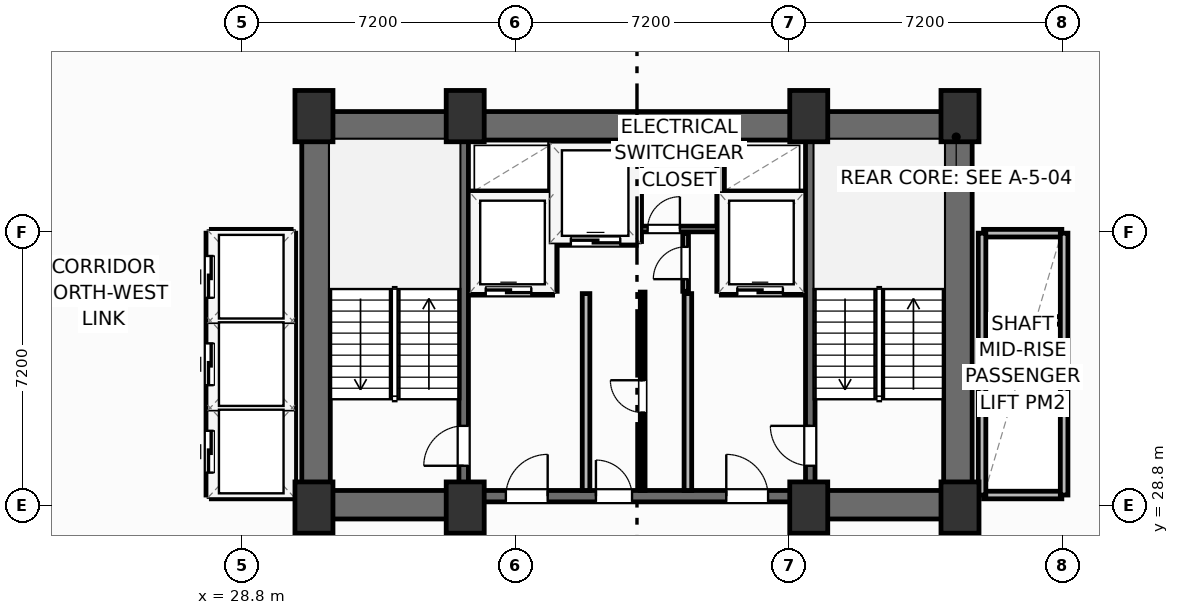
"""IFC4 building model, lengths in metres.
Left out: names, types, materials, properties, quantities, classifications, styles, units other than length and angle.
Written with IfcOpenShell. Run it as: python <this file> out.ifc"""

import sys

from ifc_helpers import new_model, si_unit, direction, frame, frame_2d, origin, origin_2d, place, context, subcontext, project, spatial, rectangle, extrude, element, fill, save


model = new_model("IFC4")
c1 = context("Model", 3, precision=1e-05, world=origin(), true_north=direction((0.0, 1.0)))
c2 = subcontext(c1, "Body", "Model", "MODEL_VIEW")
j1 = project(units=[si_unit("LENGTHUNIT", "METRE"), si_unit("PLANEANGLEUNIT", "RADIAN")], contexts=[c1])
p1 = place(None, origin())
s1 = spatial("IfcSite", under=j1, at=p1, CompositionType="ELEMENT")
p2 = place(p1, origin())
s2 = spatial("IfcBuilding", under=s1, at=p2, CompositionType="ELEMENT")
p3 = place(p2, frame((0.0, 0.0, 105.8)))
s3 = spatial("IfcBuildingStorey", under=s2, at=p3, CompositionType="ELEMENT", Elevation=105.8)
for number, where, z_axis, x_axis in (
    (1, (30.7, 28.75, 0.0), (0.0, 0.0, 1.0), (1.0, 0.0, 0.0)),
    (2, (34.68, 28.75, 0.0), (0.0, 0.0, 1.0), (1.0, 0.0, 0.0)),
    (3, (43.72, 28.75, 0.0), (0.0, 0.0, 1.0), (1.0, 0.0, 0.0)),
    (4, (47.7, 28.75, 0.0), (0.0, 0.0, 1.0), (1.0, 0.0, 0.0)),
    (5, (30.7, 39.05, 0.0), (0.0, 0.0, 1.0), (1.0, 0.0, 0.0)),
    (6, (34.68, 39.05, 0.0), (0.0, 0.0, 1.0), (1.0, 0.0, 0.0)),
    (7, (43.72, 39.05, 0.0), (0.0, 0.0, 1.0), (1.0, 0.0, 0.0)),
    (8, (47.7, 39.05, 0.0), (0.0, 0.0, 1.0), (1.0, 0.0, 0.0)),
):
    element("IfcColumn", number, at=place(p3, frame(where, z_axis=z_axis, x_axis=x_axis)), inside=s3, PredefinedType="COLUMN", context=c2, shape_type="SweptSolid", body=[
        extrude(rectangle(XDim=1.0, YDim=1.35, at=origin_2d()), origin(), (0.0, 0.0, 1.0), 3.7),
    ])
p4 = place(p3, frame((30.38, 38.795, 0.0), z_axis=(0.0, 0.0, 1.0), x_axis=(1.0, 0.0, 0.0)))
e9 = element("IfcWall", 9, at=p4, inside=s3, PredefinedType="SHEAR", context=c2, shape_type="SweptSolid", body=[
    extrude(rectangle(XDim=17.64, YDim=0.75, at=frame_2d((8.82, 0.0))), origin(), (0.0, 0.0, 1.0), 3.45),
])
for number, where, z_axis, x_axis in (
    (10, (30.755, 29.2, 0.0), (0.0, 0.0, 1.0), (0.0, 1.0, 0.0)),
    (11, (47.645, 29.2, 0.0), (0.0, 0.0, 1.0), (0.0, 1.0, 0.0)),
):
    element("IfcWall", number, at=place(p3, frame(where, z_axis=z_axis, x_axis=x_axis)), inside=s3, PredefinedType="SHEAR", context=c2, shape_type="SweptSolid", body=[
        extrude(rectangle(XDim=9.22, YDim=0.75, at=frame_2d((4.61, 0.0))), origin(), (0.0, 0.0, 1.0), 3.45),
    ])
p5 = place(p3, frame((30.38, 28.825, 0.0), z_axis=(0.0, 0.0, 1.0), x_axis=(1.0, 0.0, 0.0)))
e12 = element("IfcWall", 12, at=p5, inside=s3, PredefinedType="SHEAR", context=c2, shape_type="SweptSolid", body=[
    extrude(rectangle(XDim=4.42, YDim=0.75, at=frame_2d((2.21, 0.0))), origin(), (0.0, 0.0, 1.0), 3.45),
])
p6 = place(p3, frame((43.6, 28.825, 0.0), z_axis=(0.0, 0.0, 1.0), x_axis=(1.0, 0.0, 0.0)))
e13 = element("IfcWall", 13, at=p6, inside=s3, PredefinedType="SHEAR", context=c2, shape_type="SweptSolid", body=[
    extrude(rectangle(XDim=4.42, YDim=0.75, at=frame_2d((2.21, 0.0))), origin(), (0.0, 0.0, 1.0), 3.45),
])
p7 = place(p3, frame((34.8, 29.05, 0.0), z_axis=(0.0, 0.0, 1.0), x_axis=(1.0, 0.0, 0.0)))
e14 = element("IfcWall", 14, at=p7, inside=s3, PredefinedType="SHEAR", context=c2, shape_type="SweptSolid", body=[
    extrude(rectangle(XDim=8.8, YDim=0.3, at=frame_2d((4.4, 0.0))), origin(), (0.0, 0.0, 1.0), 3.45),
])
p8 = place(p7, frame((0.95, 0.0, 0.0)))
e15 = element("IfcOpeningElement", 15, at=p8, cuts=e14, PredefinedType="OPENING", context=c2, shape_type="SweptSolid", body=[
    extrude(rectangle(XDim=1.1, YDim=2.15, at=frame_2d((0.55, 1.075))), frame((0.0, 0.16, 0.0), z_axis=(0.0, -1.0, 0.0), x_axis=(1.0, 0.0, 0.0)), (0.0, 0.0, 1.0), 0.32),
])
p9 = place(p7, frame((6.75, 0.0, 0.0)))
e16 = element("IfcOpeningElement", 16, at=p9, cuts=e14, PredefinedType="OPENING", context=c2, shape_type="SweptSolid", body=[
    extrude(rectangle(XDim=1.1, YDim=2.15, at=frame_2d((0.55, 1.075))), frame((0.0, 0.16, 0.0), z_axis=(0.0, -1.0, 0.0), x_axis=(1.0, 0.0, 0.0)), (0.0, 0.0, 1.0), 0.32),
])
p10 = place(p7, frame((3.32, 0.0, 0.0)))
e17 = element("IfcOpeningElement", 17, at=p10, cuts=e14, PredefinedType="OPENING", context=c2, shape_type="SweptSolid", body=[
    extrude(rectangle(XDim=0.95, YDim=2.15, at=frame_2d((0.475, 1.075))), frame((0.0, 0.16, 0.0), z_axis=(0.0, -1.0, 0.0), x_axis=(1.0, 0.0, 0.0)), (0.0, 0.0, 1.0), 0.32),
])
p11 = place(p3, frame((34.64, 29.2, 0.0), z_axis=(0.0, 0.0, 1.0), x_axis=(0.0, 1.0, 0.0)))
e18 = element("IfcWall", 18, at=p11, inside=s3, PredefinedType="SHEAR", context=c2, shape_type="SweptSolid", body=[
    extrude(rectangle(XDim=9.22, YDim=0.25, at=frame_2d((4.61, 0.0))), origin(), (0.0, 0.0, 1.0), 3.45),
])
p12 = place(p11, frame((0.65, 0.0, 0.0)))
e19 = element("IfcOpeningElement", 19, at=p12, cuts=e18, PredefinedType="OPENING", context=c2, shape_type="SweptSolid", body=[
    extrude(rectangle(XDim=1.05, YDim=2.15, at=frame_2d((0.525, 1.075))), frame((0.0, 0.135, 0.0), z_axis=(0.0, -1.0, 0.0), x_axis=(1.0, 0.0, 0.0)), (0.0, 0.0, 1.0), 0.27),
])
p13 = place(p3, frame((43.76, 29.2, 0.0), z_axis=(0.0, 0.0, 1.0), x_axis=(0.0, 1.0, 0.0)))
e20 = element("IfcWall", 20, at=p13, inside=s3, PredefinedType="SHEAR", context=c2, shape_type="SweptSolid", body=[
    extrude(rectangle(XDim=9.22, YDim=0.25, at=frame_2d((4.61, 0.0))), origin(), (0.0, 0.0, 1.0), 3.45),
])
p14 = place(p13, frame((0.65, 0.0, 0.0)))
e21 = element("IfcOpeningElement", 21, at=p14, cuts=e20, PredefinedType="OPENING", context=c2, shape_type="SweptSolid", body=[
    extrude(rectangle(XDim=1.05, YDim=2.15, at=frame_2d((0.525, 1.075))), frame((0.0, 0.135, 0.0), z_axis=(0.0, -1.0, 0.0), x_axis=(1.0, 0.0, 0.0)), (0.0, 0.0, 1.0), 0.27),
])
for number, where, z_axis, x_axis in (
    (22, (37.86, 29.2, 0.0), (0.0, 0.0, 1.0), (0.0, 1.0, 0.0)),
    (23, (40.54, 29.2, 0.0), (0.0, 0.0, 1.0), (0.0, 1.0, 0.0)),
):
    element("IfcWall", number, at=place(p3, frame(where, z_axis=z_axis, x_axis=x_axis)), inside=s3, PredefinedType="PARTITIONING", context=c2, shape_type="SweptSolid", body=[
        extrude(rectangle(XDim=5.18, YDim=0.2, at=frame_2d((2.59, 0.0))), origin(), (0.0, 0.0, 1.0), 3.45),
    ])
p15 = place(p3, frame((34.8, 34.44, 0.0), z_axis=(0.0, 0.0, 1.0), x_axis=(1.0, 0.0, 0.0)))
e24 = element("IfcWall", 24, at=p15, inside=s3, PredefinedType="PARTITIONING", context=c2, shape_type="SweptSolid", body=[
    extrude(rectangle(XDim=2.18, YDim=0.2, at=frame_2d((1.09, 0.0))), origin(), (0.0, 0.0, 1.0), 3.45),
])
p16 = place(p15, frame((0.42, 0.0, 0.0)))
e25 = element("IfcOpeningElement", 25, at=p16, cuts=e24, PredefinedType="OPENING", context=c2, shape_type="SweptSolid", body=[
    extrude(rectangle(XDim=1.2, YDim=2.2, at=frame_2d((0.6, 1.1))), frame((0.0, 0.11, 0.0), z_axis=(0.0, -1.0, 0.0), x_axis=(1.0, 0.0, 0.0)), (0.0, 0.0, 1.0), 0.22),
])
p17 = place(p3, frame((34.8, 36.98, 0.0), z_axis=(0.0, 0.0, 1.0), x_axis=(1.0, 0.0, 0.0)))
e26 = element("IfcWall", 26, at=p17, inside=s3, PredefinedType="PARTITIONING", context=c2, shape_type="SweptSolid", body=[
    extrude(rectangle(XDim=2.18, YDim=0.2, at=frame_2d((1.09, 0.0))), origin(), (0.0, 0.0, 1.0), 3.45),
])
p18 = place(p3, frame((37.0, 34.44, 0.0), z_axis=(0.0, 0.0, 1.0), x_axis=(0.0, 1.0, 0.0)))
e27 = element("IfcWall", 27, at=p18, inside=s3, PredefinedType="PARTITIONING", context=c2, shape_type="SweptSolid", body=[
    extrude(rectangle(XDim=3.9, YDim=0.2, at=frame_2d((1.95, 0.0))), origin(), (0.0, 0.0, 1.0), 3.45),
])
p19 = place(p3, frame((41.42, 34.44, 0.0), z_axis=(0.0, 0.0, 1.0), x_axis=(1.0, 0.0, 0.0)))
e28 = element("IfcWall", 28, at=p19, inside=s3, PredefinedType="PARTITIONING", context=c2, shape_type="SweptSolid", body=[
    extrude(rectangle(XDim=2.18, YDim=0.2, at=frame_2d((1.09, 0.0))), origin(), (0.0, 0.0, 1.0), 3.45),
])
p20 = place(p19, frame((0.42, 0.0, 0.0)))
e29 = element("IfcOpeningElement", 29, at=p20, cuts=e28, PredefinedType="OPENING", context=c2, shape_type="SweptSolid", body=[
    extrude(rectangle(XDim=1.2, YDim=2.2, at=frame_2d((0.6, 1.1))), frame((0.0, 0.11, 0.0), z_axis=(0.0, -1.0, 0.0), x_axis=(1.0, 0.0, 0.0)), (0.0, 0.0, 1.0), 0.22),
])
p21 = place(p3, frame((41.42, 36.98, 0.0), z_axis=(0.0, 0.0, 1.0), x_axis=(1.0, 0.0, 0.0)))
e30 = element("IfcWall", 30, at=p21, inside=s3, PredefinedType="PARTITIONING", context=c2, shape_type="SweptSolid", body=[
    extrude(rectangle(XDim=2.18, YDim=0.2, at=frame_2d((1.09, 0.0))), origin(), (0.0, 0.0, 1.0), 3.45),
])
p22 = place(p3, frame((41.4, 34.44, 0.0), z_axis=(0.0, 0.0, 1.0), x_axis=(0.0, 1.0, 0.0)))
e31 = element("IfcWall", 31, at=p22, inside=s3, PredefinedType="PARTITIONING", context=c2, shape_type="SweptSolid", body=[
    extrude(rectangle(XDim=3.9, YDim=0.2, at=frame_2d((1.95, 0.0))), origin(), (0.0, 0.0, 1.0), 3.45),
])
p23 = place(p3, frame((37.06, 35.75, 0.0), z_axis=(0.0, 0.0, 1.0), x_axis=(1.0, 0.0, 0.0)))
e32 = element("IfcWall", 32, at=p23, inside=s3, PredefinedType="PARTITIONING", context=c2, shape_type="SweptSolid", body=[
    extrude(rectangle(XDim=2.12, YDim=0.2, at=frame_2d((1.06, 0.0))), origin(), (0.0, 0.0, 1.0), 3.45),
])
p24 = place(p23, frame((0.4, 0.0, 0.0)))
e33 = element("IfcOpeningElement", 33, at=p24, cuts=e32, PredefinedType="OPENING", context=c2, shape_type="SweptSolid", body=[
    extrude(rectangle(XDim=1.3, YDim=2.2, at=frame_2d((0.65, 1.1))), frame((0.0, 0.11, 0.0), z_axis=(0.0, -1.0, 0.0), x_axis=(1.0, 0.0, 0.0)), (0.0, 0.0, 1.0), 0.22),
])
p25 = place(p3, frame((39.22, 35.75, 0.0), z_axis=(0.0, 0.0, 1.0), x_axis=(0.0, 1.0, 0.0)))
e34 = element("IfcWall", 34, at=p25, inside=s3, PredefinedType="PARTITIONING", context=c2, shape_type="SweptSolid", body=[
    extrude(rectangle(XDim=2.59, YDim=0.2, at=frame_2d((1.295, 0.0))), origin(), (0.0, 0.0, 1.0), 3.45),
])
p26 = place(p3, frame((39.3, 36.08, 0.0), z_axis=(0.0, 0.0, 1.0), x_axis=(1.0, 0.0, 0.0)))
e35 = element("IfcWall", 35, at=p26, inside=s3, PredefinedType="PARTITIONING", context=c2, shape_type="SweptSolid", body=[
    extrude(rectangle(XDim=2.02, YDim=0.15, at=frame_2d((1.01, 0.0))), origin(), (0.0, 0.0, 1.0), 3.45),
])
p27 = place(p26, frame((0.18, 0.0, 0.0)))
e36 = element("IfcOpeningElement", 36, at=p27, cuts=e35, PredefinedType="OPENING", context=c2, shape_type="SweptSolid", body=[
    extrude(rectangle(XDim=0.85, YDim=2.05, at=frame_2d((0.425, 1.025))), frame((0.0, 0.085, 0.0), z_axis=(0.0, -1.0, 0.0), x_axis=(1.0, 0.0, 0.0)), (0.0, 0.0, 1.0), 0.17),
])
p28 = place(p3, frame((40.48, 34.44, 0.0), z_axis=(0.0, 0.0, 1.0), x_axis=(0.0, 1.0, 0.0)))
e37 = element("IfcWall", 37, at=p28, inside=s3, PredefinedType="PARTITIONING", context=c2, shape_type="SweptSolid", body=[
    extrude(rectangle(XDim=1.52, YDim=0.15, at=frame_2d((0.76, 0.0))), origin(), (0.0, 0.0, 1.0), 3.45),
])
p29 = place(p28, frame((0.32, 0.0, 0.0)))
e38 = element("IfcOpeningElement", 38, at=p29, cuts=e37, PredefinedType="OPENING", context=c2, shape_type="SweptSolid", body=[
    extrude(rectangle(XDim=0.85, YDim=2.05, at=frame_2d((0.425, 1.025))), frame((0.0, 0.085, 0.0), z_axis=(0.0, -1.0, 0.0), x_axis=(1.0, 0.0, 0.0)), (0.0, 0.0, 1.0), 0.17),
])
p30 = place(p3, frame((39.35, 29.2, 0.0), z_axis=(0.0, 0.0, 1.0), x_axis=(0.0, 1.0, 0.0)))
e39 = element("IfcWall", 39, at=p30, inside=s3, PredefinedType="PARTITIONING", context=c2, shape_type="SweptSolid", body=[
    extrude(rectangle(XDim=5.22, YDim=0.125, at=frame_2d((2.61, 0.0))), origin(), (0.0, 0.0, 1.0), 3.45),
])
p31 = place(p30, frame((2.05, 0.0, 0.0)))
e40 = element("IfcOpeningElement", 40, at=p31, cuts=e39, PredefinedType="OPENING", context=c2, shape_type="SweptSolid", body=[
    extrude(rectangle(XDim=0.85, YDim=2.05, at=frame_2d((0.425, 1.025))), frame((0.0, 0.073, 0.0), z_axis=(0.0, -1.0, 0.0), x_axis=(1.0, 0.0, 0.0)), (0.0, 0.0, 1.0), 0.145),
])
for number, where, z_axis, x_axis in (
    (41, (28.02, 31.375, 0.0), (0.0, 0.0, 1.0), (1.0, 0.0, 0.0)),
    (42, (28.02, 33.675, 0.0), (0.0, 0.0, 1.0), (1.0, 0.0, 0.0)),
):
    element("IfcWall", number, at=place(p3, frame(where, z_axis=z_axis, x_axis=x_axis)), inside=s3, PredefinedType="PARTITIONING", context=c2, shape_type="SweptSolid", body=[
        extrude(rectangle(XDim=2.06, YDim=0.2, at=frame_2d((1.03, 0.0))), origin(), (0.0, 0.0, 1.0), 3.45),
    ])
for number, where, z_axis, x_axis in (
    (43, (28.0, 29.08, 0.0), (0.0, 0.0, 1.0), (1.0, 0.0, 0.0)),
    (44, (28.0, 35.97, 0.0), (0.0, 0.0, 1.0), (1.0, 0.0, 0.0)),
):
    element("IfcWall", number, at=place(p3, frame(where, z_axis=z_axis, x_axis=x_axis)), inside=s3, PredefinedType="PARTITIONING", context=c2, shape_type="SweptSolid", body=[
        extrude(rectangle(XDim=2.1, YDim=0.2, at=frame_2d((1.05, 0.0))), origin(), (0.0, 0.0, 1.0), 3.45),
    ])
p32 = place(p3, frame((30.12, 29.08, 0.0), z_axis=(0.0, 0.0, 1.0), x_axis=(0.0, 1.0, 0.0)))
e45 = element("IfcWall", 45, at=p32, inside=s3, PredefinedType="PARTITIONING", context=c2, shape_type="SweptSolid", body=[
    extrude(rectangle(XDim=6.89, YDim=0.2, at=frame_2d((3.445, 0.0))), origin(), (0.0, 0.0, 1.0), 3.45),
])
p33 = place(p3, frame((27.96, 29.08, 0.0), z_axis=(0.0, 0.0, 1.0), x_axis=(0.0, 1.0, 0.0)))
e46 = element("IfcWall", 46, at=p33, inside=s3, PredefinedType="PARTITIONING", context=c2, shape_type="SweptSolid", body=[
    extrude(rectangle(XDim=6.89, YDim=0.2, at=frame_2d((3.445, 0.0))), origin(), (0.0, 0.0, 1.0), 3.45),
])
p34 = place(p33, frame((0.59, 0.0, 0.0)))
e47 = element("IfcOpeningElement", 47, at=p34, cuts=e46, PredefinedType="OPENING", context=c2, shape_type="SweptSolid", body=[
    extrude(rectangle(XDim=1.1, YDim=2.15, at=frame_2d((0.55, 1.075))), frame((0.0, 0.11, 0.0), z_axis=(0.0, -1.0, 0.0), x_axis=(1.0, 0.0, 0.0)), (0.0, 0.0, 1.0), 0.22),
])
p35 = place(p33, frame((2.89, 0.0, 0.0)))
e48 = element("IfcOpeningElement", 48, at=p35, cuts=e46, PredefinedType="OPENING", context=c2, shape_type="SweptSolid", body=[
    extrude(rectangle(XDim=1.1, YDim=2.15, at=frame_2d((0.55, 1.075))), frame((0.0, 0.11, 0.0), z_axis=(0.0, -1.0, 0.0), x_axis=(1.0, 0.0, 0.0)), (0.0, 0.0, 1.0), 0.22),
])
p36 = place(p33, frame((5.19, 0.0, 0.0)))
e49 = element("IfcOpeningElement", 49, at=p36, cuts=e46, PredefinedType="OPENING", context=c2, shape_type="SweptSolid", body=[
    extrude(rectangle(XDim=1.1, YDim=2.15, at=frame_2d((0.55, 1.075))), frame((0.0, 0.11, 0.0), z_axis=(0.0, -1.0, 0.0), x_axis=(1.0, 0.0, 0.0)), (0.0, 0.0, 1.0), 0.22),
])
for number, where, z_axis, x_axis in (
    (50, (48.32, 31.375, 0.0), (0.0, 0.0, 1.0), (1.0, 0.0, 0.0)),
    (51, (48.32, 33.675, 0.0), (0.0, 0.0, 1.0), (1.0, 0.0, 0.0)),
):
    element("IfcWall", number, at=place(p3, frame(where, z_axis=z_axis, x_axis=x_axis)), inside=s3, PredefinedType="PARTITIONING", context=c2, shape_type="SweptSolid", body=[
        extrude(rectangle(XDim=2.06, YDim=0.2, at=frame_2d((1.03, 0.0))), origin(), (0.0, 0.0, 1.0), 3.45),
    ])
p37 = place(p3, frame((48.32, 29.08, 0.0), z_axis=(0.0, 0.0, 1.0), x_axis=(1.0, 0.0, 0.0)))
e52 = element("IfcWall", 52, at=p37, inside=s3, PredefinedType="PARTITIONING", context=c2, shape_type="SweptSolid", body=[
    extrude(rectangle(XDim=2.06, YDim=0.2, at=frame_2d((1.03, 0.0))), origin(), (0.0, 0.0, 1.0), 2.662),
])
p38 = place(p3, frame((48.32, 35.97, 0.0), z_axis=(0.0, 0.0, 1.0), x_axis=(1.0, 0.0, 0.0)))
e53 = element("IfcWall", 53, at=p38, inside=s3, PredefinedType="PARTITIONING", context=c2, shape_type="SweptSolid", body=[
    extrude(rectangle(XDim=2.06, YDim=0.2, at=frame_2d((1.03, 0.0))), origin(), (0.0, 0.0, 1.0), 3.45),
])
for number, where, z_axis, x_axis in (
    (54, (48.28, 29.08, 0.0), (0.0, 0.0, 1.0), (0.0, 1.0, 0.0)),
    (55, (50.44, 29.08, 0.0), (0.0, 0.0, 1.0), (0.0, 1.0, 0.0)),
):
    element("IfcWall", number, at=place(p3, frame(where, z_axis=z_axis, x_axis=x_axis)), inside=s3, PredefinedType="PARTITIONING", context=c2, shape_type="SweptSolid", body=[
        extrude(rectangle(XDim=6.89, YDim=0.2, at=frame_2d((3.445, 0.0))), origin(), (0.0, 0.0, 1.0), 3.45),
    ])
p39 = place(p12, origin())
e56 = element("IfcDoor", 56, at=p39, inside=s3, OperationType="SINGLE_SWING_LEFT", PredefinedType="DOOR", context=c2, shape_type="SweptSolid", body=[
    extrude(rectangle(XDim=1.05, YDim=2.15, at=frame_2d((0.525, 1.075))), frame((0.0, 0.025, 0.0), z_axis=(0.0, -1.0, 0.0), x_axis=(1.0, 0.0, 0.0)), (0.0, 0.0, 1.0), 0.05),
])
fill(e19, e56)
p40 = place(p14, origin())
e57 = element("IfcDoor", 57, at=p40, inside=s3, OperationType="SINGLE_SWING_RIGHT", PredefinedType="DOOR", context=c2, shape_type="SweptSolid", body=[
    extrude(rectangle(XDim=1.05, YDim=2.15, at=frame_2d((0.525, 1.075))), frame((0.0, 0.025, 0.0), z_axis=(0.0, -1.0, 0.0), x_axis=(1.0, 0.0, 0.0)), (0.0, 0.0, 1.0), 0.05),
])
fill(e21, e57)
p41 = place(p8, origin())
e58 = element("IfcDoor", 58, at=p41, inside=s3, OperationType="SINGLE_SWING_RIGHT", PredefinedType="DOOR", context=c2, shape_type="SweptSolid", body=[
    extrude(rectangle(XDim=1.1, YDim=2.15, at=frame_2d((0.55, 1.075))), frame((0.0, 0.025, 0.0), z_axis=(0.0, -1.0, 0.0), x_axis=(1.0, 0.0, 0.0)), (0.0, 0.0, 1.0), 0.05),
])
fill(e15, e58)
p42 = place(p9, origin())
e59 = element("IfcDoor", 59, at=p42, inside=s3, OperationType="SINGLE_SWING_LEFT", PredefinedType="DOOR", context=c2, shape_type="SweptSolid", body=[
    extrude(rectangle(XDim=1.1, YDim=2.15, at=frame_2d((0.55, 1.075))), frame((0.0, 0.025, 0.0), z_axis=(0.0, -1.0, 0.0), x_axis=(1.0, 0.0, 0.0)), (0.0, 0.0, 1.0), 0.05),
])
fill(e16, e59)
p43 = place(p16, origin())
e60 = element("IfcDoor", 60, at=p43, inside=s3, OperationType="SLIDING_TO_LEFT", PredefinedType="DOOR", context=c2, shape_type="SweptSolid", body=[
    extrude(rectangle(XDim=1.2, YDim=2.2, at=frame_2d((0.6, 1.1))), frame((0.0, 0.025, 0.0), z_axis=(0.0, -1.0, 0.0), x_axis=(1.0, 0.0, 0.0)), (0.0, 0.0, 1.0), 0.05),
])
fill(e25, e60)
p44 = place(p20, origin())
e61 = element("IfcDoor", 61, at=p44, inside=s3, OperationType="SLIDING_TO_LEFT", PredefinedType="DOOR", context=c2, shape_type="SweptSolid", body=[
    extrude(rectangle(XDim=1.2, YDim=2.2, at=frame_2d((0.6, 1.1))), frame((0.0, 0.025, 0.0), z_axis=(0.0, -1.0, 0.0), x_axis=(1.0, 0.0, 0.0)), (0.0, 0.0, 1.0), 0.05),
])
fill(e29, e61)
p45 = place(p24, origin())
e62 = element("IfcDoor", 62, at=p45, inside=s3, OperationType="SLIDING_TO_LEFT", PredefinedType="DOOR", context=c2, shape_type="SweptSolid", body=[
    extrude(rectangle(XDim=1.3, YDim=2.2, at=frame_2d((0.65, 1.1))), frame((0.0, 0.025, 0.0), z_axis=(0.0, -1.0, 0.0), x_axis=(1.0, 0.0, 0.0)), (0.0, 0.0, 1.0), 0.05),
])
fill(e33, e62)
p46 = place(p27, origin())
e63 = element("IfcDoor", 63, at=p46, inside=s3, OperationType="SINGLE_SWING_RIGHT", PredefinedType="DOOR", context=c2, shape_type="SweptSolid", body=[
    extrude(rectangle(XDim=0.85, YDim=2.05, at=frame_2d((0.425, 1.025))), frame((0.0, 0.025, 0.0), z_axis=(0.0, -1.0, 0.0), x_axis=(1.0, 0.0, 0.0)), (0.0, 0.0, 1.0), 0.05),
])
fill(e36, e63)
p47 = place(p29, origin())
e64 = element("IfcDoor", 64, at=p47, inside=s3, OperationType="SINGLE_SWING_LEFT", PredefinedType="DOOR", context=c2, shape_type="SweptSolid", body=[
    extrude(rectangle(XDim=0.85, YDim=2.05, at=frame_2d((0.425, 1.025))), frame((0.0, 0.025, 0.0), z_axis=(0.0, -1.0, 0.0), x_axis=(1.0, 0.0, 0.0)), (0.0, 0.0, 1.0), 0.05),
])
fill(e38, e64)
p48 = place(p31, origin())
e65 = element("IfcDoor", 65, at=p48, inside=s3, OperationType="SINGLE_SWING_RIGHT", PredefinedType="DOOR", context=c2, shape_type="SweptSolid", body=[
    extrude(rectangle(XDim=0.85, YDim=2.05, at=frame_2d((0.425, 1.025))), frame((0.0, 0.025, 0.0), z_axis=(0.0, -1.0, 0.0), x_axis=(1.0, 0.0, 0.0)), (0.0, 0.0, 1.0), 0.05),
])
fill(e40, e65)
p49 = place(p10, origin())
e66 = element("IfcDoor", 66, at=p49, inside=s3, OperationType="SINGLE_SWING_LEFT", PredefinedType="DOOR", context=c2, shape_type="SweptSolid", body=[
    extrude(rectangle(XDim=0.95, YDim=2.15, at=frame_2d((0.475, 1.075))), frame((0.0, 0.025, 0.0), z_axis=(0.0, -1.0, 0.0), x_axis=(1.0, 0.0, 0.0)), (0.0, 0.0, 1.0), 0.05),
])
fill(e17, e66)
p50 = place(p34, origin())
e67 = element("IfcDoor", 67, at=p50, inside=s3, OperationType="SLIDING_TO_LEFT", PredefinedType="DOOR", context=c2, shape_type="SweptSolid", body=[
    extrude(rectangle(XDim=1.1, YDim=2.15, at=frame_2d((0.55, 1.075))), frame((0.0, 0.025, 0.0), z_axis=(0.0, -1.0, 0.0), x_axis=(1.0, 0.0, 0.0)), (0.0, 0.0, 1.0), 0.05),
])
fill(e47, e67)
p51 = place(p35, origin())
e68 = element("IfcDoor", 68, at=p51, inside=s3, OperationType="SLIDING_TO_LEFT", PredefinedType="DOOR", context=c2, shape_type="SweptSolid", body=[
    extrude(rectangle(XDim=1.1, YDim=2.15, at=frame_2d((0.55, 1.075))), frame((0.0, 0.025, 0.0), z_axis=(0.0, -1.0, 0.0), x_axis=(1.0, 0.0, 0.0)), (0.0, 0.0, 1.0), 0.05),
])
fill(e48, e68)
p52 = place(p36, origin())
e69 = element("IfcDoor", 69, at=p52, inside=s3, OperationType="SLIDING_TO_LEFT", PredefinedType="DOOR", context=c2, shape_type="SweptSolid", body=[
    extrude(rectangle(XDim=1.1, YDim=2.15, at=frame_2d((0.55, 1.075))), frame((0.0, 0.025, 0.0), z_axis=(0.0, -1.0, 0.0), x_axis=(1.0, 0.0, 0.0)), (0.0, 0.0, 1.0), 0.05),
])
fill(e49, e69)
save(model, sys.argv[1])
